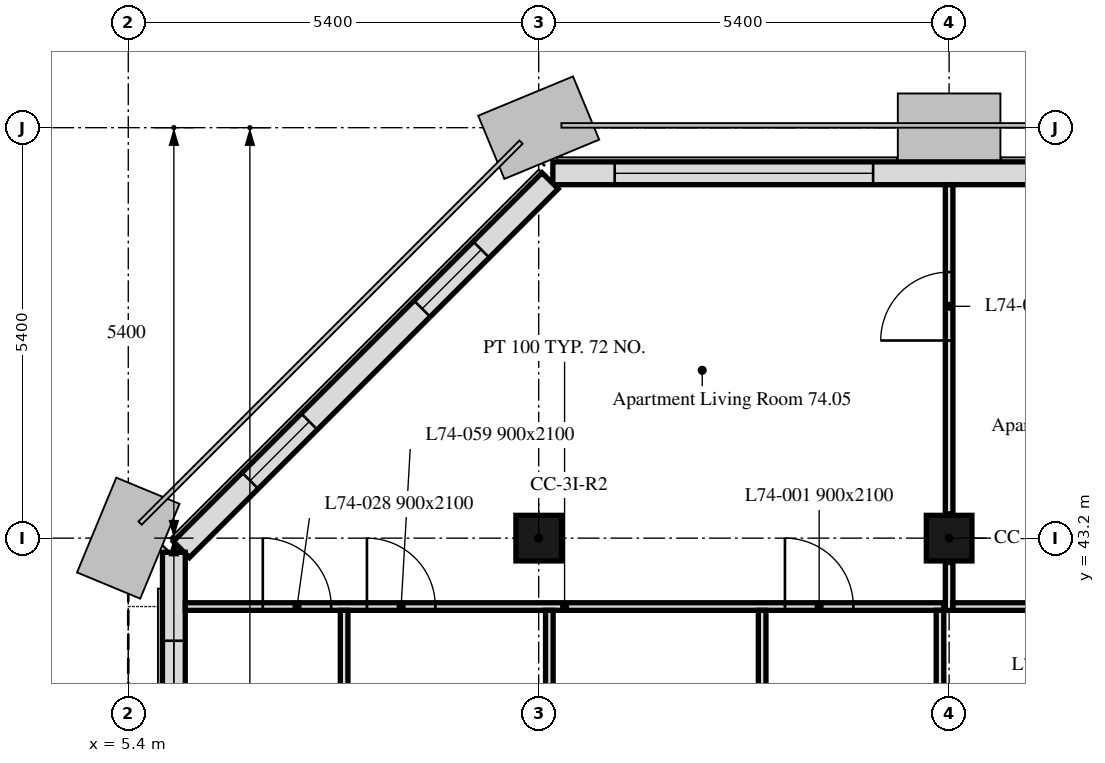
"""IFC4 building model, lengths in metres.
Left out: names, types, materials, properties, quantities, classifications, styles, units other than length and angle.
Written with IfcOpenShell. Run it as: python <this file> out.ifc"""

import sys

from ifc_helpers import new_model, si_unit, direction, frame, frame_2d, origin, origin_2d, place, context, subcontext, project, spatial, rectangle, extrude, element, fill, save


model = new_model("IFC4")
c1 = context("Model", 3, precision=1e-05, world=origin(), true_north=direction((0.0, 1.0)))
c2 = subcontext(c1, "Body", "Model", "MODEL_VIEW")
j1 = project(units=[si_unit("LENGTHUNIT", "METRE"), si_unit("PLANEANGLEUNIT", "RADIAN")], contexts=[c1])
p1 = place(None, origin())
s1 = spatial("IfcSite", under=j1, at=p1, CompositionType="ELEMENT")
p2 = place(p1, origin())
s2 = spatial("IfcBuilding", under=s1, at=p2, CompositionType="ELEMENT")
p3 = place(p2, frame((0.0, 0.0, 298.3)))
s3 = spatial("IfcBuildingStorey", under=s2, at=p3, CompositionType="ELEMENT", Elevation=298.3)
for number, where, z_axis, x_axis in (
    (1, (10.8, 43.2, 0.0), (0.0, 0.0, 1.0), (1.0, 0.0, 0.0)),
    (2, (16.2, 43.2, 0.0), (0.0, 0.0, 1.0), (1.0, 0.0, 0.0)),
):
    element("IfcColumn", number, at=place(p3, frame(where, z_axis=z_axis, x_axis=x_axis)), inside=s3, PredefinedType="COLUMN", context=c2, shape_type="SweptSolid", body=[
        extrude(rectangle(XDim=0.6, YDim=0.6, at=origin_2d()), origin(), (0.0, 0.0, 1.0), 3.0),
    ])
p4 = place(p3, frame((43.014, 48.0, 0.0), z_axis=(0.0, 0.0, 1.0), x_axis=(-1.0, 0.0, 0.0)))
e3 = element("IfcWall", 3, at=p4, inside=s3, PredefinedType="SOLIDWALL", context=c2, shape_type="SweptSolid", body=[
    extrude(rectangle(XDim=32.027, YDim=0.3, at=frame_2d((16.014, 0.0))), origin(), (0.0, 0.0, 1.0), 3.0),
])
p5 = place(p4, frame((2.764, 0.0, 0.9)))
e4 = element("IfcOpeningElement", 4, at=p5, cuts=e3, PredefinedType="OPENING", context=c2, shape_type="SweptSolid", body=[
    extrude(rectangle(XDim=1.1, YDim=1.7, at=frame_2d((0.55, 0.85))), frame((0.0, 0.16, 0.0), z_axis=(0.0, -1.0, 0.0), x_axis=(1.0, 0.0, 0.0)), (0.0, 0.0, 1.0), 0.32),
])
p6 = place(p4, frame((6.214, 0.0, 0.9)))
e5 = element("IfcOpeningElement", 5, at=p6, cuts=e3, PredefinedType="OPENING", context=c2, shape_type="SweptSolid", body=[
    extrude(rectangle(XDim=3.4, YDim=1.7, at=frame_2d((1.7, 0.85))), frame((0.0, 0.16, 0.0), z_axis=(0.0, -1.0, 0.0), x_axis=(1.0, 0.0, 0.0)), (0.0, 0.0, 1.0), 0.32),
])
p7 = place(p4, frame((13.564, 0.0, 0.9)))
e6 = element("IfcOpeningElement", 6, at=p7, cuts=e3, PredefinedType="OPENING", context=c2, shape_type="SweptSolid", body=[
    extrude(rectangle(XDim=1.1, YDim=1.7, at=frame_2d((0.55, 0.85))), frame((0.0, 0.16, 0.0), z_axis=(0.0, -1.0, 0.0), x_axis=(1.0, 0.0, 0.0)), (0.0, 0.0, 1.0), 0.32),
])
p8 = place(p4, frame((17.014, 0.0, 0.9)))
e7 = element("IfcOpeningElement", 7, at=p8, cuts=e3, PredefinedType="OPENING", context=c2, shape_type="SweptSolid", body=[
    extrude(rectangle(XDim=3.4, YDim=1.7, at=frame_2d((1.7, 0.85))), frame((0.0, 0.16, 0.0), z_axis=(0.0, -1.0, 0.0), x_axis=(1.0, 0.0, 0.0)), (0.0, 0.0, 1.0), 0.32),
])
p9 = place(p4, frame((24.364, 0.0, 0.9)))
e8 = element("IfcOpeningElement", 8, at=p9, cuts=e3, PredefinedType="OPENING", context=c2, shape_type="SweptSolid", body=[
    extrude(rectangle(XDim=1.1, YDim=1.7, at=frame_2d((0.55, 0.85))), frame((0.0, 0.16, 0.0), z_axis=(0.0, -1.0, 0.0), x_axis=(1.0, 0.0, 0.0)), (0.0, 0.0, 1.0), 0.32),
])
p10 = place(p4, frame((27.814, 0.0, 0.9)))
e9 = element("IfcOpeningElement", 9, at=p10, cuts=e3, PredefinedType="OPENING", context=c2, shape_type="SweptSolid", body=[
    extrude(rectangle(XDim=3.4, YDim=1.7, at=frame_2d((1.7, 0.85))), frame((0.0, 0.16, 0.0), z_axis=(0.0, -1.0, 0.0), x_axis=(1.0, 0.0, 0.0)), (0.0, 0.0, 1.0), 0.32),
])
p11 = place(p3, frame((10.949, 47.901, 0.0), z_axis=(0.0, 0.0, 1.0), x_axis=(-0.707106781187, -0.707106781187, 0.0)))
e10 = element("IfcWall", 10, at=p11, inside=s3, PredefinedType="SOLIDWALL", context=c2, shape_type="SweptSolid", body=[
    extrude(rectangle(XDim=6.86, YDim=0.3, at=frame_2d((3.43, 0.0))), origin(), (0.0, 0.0, 1.0), 3.0),
])
p12 = place(p11, frame((1.28, 0.0, 0.9)))
e11 = element("IfcOpeningElement", 11, at=p12, cuts=e10, PredefinedType="OPENING", context=c2, shape_type="SweptSolid", body=[
    extrude(rectangle(XDim=1.1, YDim=1.7, at=frame_2d((0.55, 0.85))), frame((0.0, 0.16, 0.0), z_axis=(0.0, -1.0, 0.0), x_axis=(1.0, 0.0, 0.0)), (0.0, 0.0, 1.0), 0.32),
])
p13 = place(p11, frame((4.48, 0.0, 0.9)))
e12 = element("IfcOpeningElement", 12, at=p13, cuts=e10, PredefinedType="OPENING", context=c2, shape_type="SweptSolid", body=[
    extrude(rectangle(XDim=1.1, YDim=1.7, at=frame_2d((0.55, 0.85))), frame((0.0, 0.16, 0.0), z_axis=(0.0, -1.0, 0.0), x_axis=(1.0, 0.0, 0.0)), (0.0, 0.0, 1.0), 0.32),
])
p14 = place(p3, frame((6.0, 43.014, 0.0), z_axis=(0.0, 0.0, 1.0), x_axis=(0.0, -1.0, 0.0)))
e13 = element("IfcWall", 13, at=p14, inside=s3, PredefinedType="SOLIDWALL", context=c2, shape_type="SweptSolid", body=[
    extrude(rectangle(XDim=10.614, YDim=0.3, at=frame_2d((5.307, 0.0))), origin(), (0.0, 0.0, 1.0), 3.0),
])
p15 = place(p14, frame((1.164, 0.0, 0.9)))
e14 = element("IfcOpeningElement", 14, at=p15, cuts=e13, PredefinedType="OPENING", context=c2, shape_type="SweptSolid", body=[
    extrude(rectangle(XDim=1.1, YDim=1.7, at=frame_2d((0.55, 0.85))), frame((0.0, 0.16, 0.0), z_axis=(0.0, -1.0, 0.0), x_axis=(1.0, 0.0, 0.0)), (0.0, 0.0, 1.0), 0.32),
])
p16 = place(p14, frame((2.764, 0.0, 0.9)))
e15 = element("IfcOpeningElement", 15, at=p16, cuts=e13, PredefinedType="OPENING", context=c2, shape_type="SweptSolid", body=[
    extrude(rectangle(XDim=1.1, YDim=1.7, at=frame_2d((0.55, 0.85))), frame((0.0, 0.16, 0.0), z_axis=(0.0, -1.0, 0.0), x_axis=(1.0, 0.0, 0.0)), (0.0, 0.0, 1.0), 0.32),
])
p17 = place(p14, frame((6.564, 0.0, 0.9)))
e16 = element("IfcOpeningElement", 16, at=p17, cuts=e13, PredefinedType="OPENING", context=c2, shape_type="SweptSolid", body=[
    extrude(rectangle(XDim=1.1, YDim=1.7, at=frame_2d((0.55, 0.85))), frame((0.0, 0.16, 0.0), z_axis=(0.0, -1.0, 0.0), x_axis=(1.0, 0.0, 0.0)), (0.0, 0.0, 1.0), 0.32),
])
p18 = place(p14, frame((7.989, 0.0, 0.9)))
e17 = element("IfcOpeningElement", 17, at=p18, cuts=e13, PredefinedType="OPENING", context=c2, shape_type="SweptSolid", body=[
    extrude(rectangle(XDim=0.65, YDim=1.7, at=frame_2d((0.325, 0.85))), frame((0.0, 0.16, 0.0), z_axis=(0.0, -1.0, 0.0), x_axis=(1.0, 0.0, 0.0)), (0.0, 0.0, 1.0), 0.32),
])
p19 = place(p3, frame((6.151, 42.3, 0.0), z_axis=(0.0, 0.0, 1.0), x_axis=(1.0, 0.0, 0.0)))
e18 = element("IfcWall", 18, at=p19, inside=s3, PredefinedType="PARTITIONING", context=c2, shape_type="SweptSolid", body=[
    extrude(rectangle(XDim=9.979, YDim=0.1, at=frame_2d((4.99, 0.0))), origin(), (0.0, 0.0, 1.0), 3.0),
])
p20 = place(p19, frame((7.889, 0.0, 0.0)))
e19 = element("IfcOpeningElement", 19, at=p20, cuts=e18, PredefinedType="OPENING", context=c2, shape_type="SweptSolid", body=[
    extrude(rectangle(XDim=0.9, YDim=2.1, at=frame_2d((0.45, 1.05))), frame((0.0, 0.05, 0.0), z_axis=(0.0, -1.0, 0.0), x_axis=(1.0, 0.0, 0.0)), (0.0, 0.0, 1.0), 0.1),
])
p21 = place(p19, frame((1.019, 0.0, 0.0)))
e20 = element("IfcOpeningElement", 20, at=p21, cuts=e18, PredefinedType="OPENING", context=c2, shape_type="SweptSolid", body=[
    extrude(rectangle(XDim=0.9, YDim=2.1, at=frame_2d((0.45, 1.05))), frame((0.0, 0.05, 0.0), z_axis=(0.0, -1.0, 0.0), x_axis=(1.0, 0.0, 0.0)), (0.0, 0.0, 1.0), 0.1),
])
p22 = place(p19, frame((2.389, 0.0, 0.0)))
e21 = element("IfcOpeningElement", 21, at=p22, cuts=e18, PredefinedType="OPENING", context=c2, shape_type="SweptSolid", body=[
    extrude(rectangle(XDim=0.9, YDim=2.1, at=frame_2d((0.45, 1.05))), frame((0.0, 0.05, 0.0), z_axis=(0.0, -1.0, 0.0), x_axis=(1.0, 0.0, 0.0)), (0.0, 0.0, 1.0), 0.1),
])
p23 = place(p3, frame((16.2, 42.25, 0.0), z_axis=(0.0, 0.0, 1.0), x_axis=(0.0, 1.0, 0.0)))
e22 = element("IfcWall", 22, at=p23, inside=s3, PredefinedType="PARTITIONING", context=c2, shape_type="SweptSolid", body=[
    extrude(rectangle(XDim=0.63, YDim=0.1, at=frame_2d((0.315, 0.0))), origin(), (0.0, 0.0, 1.0), 2.4),
])
p24 = place(p3, frame((16.2, 43.52, 0.0), z_axis=(0.0, 0.0, 1.0), x_axis=(0.0, 1.0, 0.0)))
e23 = element("IfcWall", 23, at=p24, inside=s3, PredefinedType="PARTITIONING", context=c2, shape_type="SweptSolid", body=[
    extrude(rectangle(XDim=4.329, YDim=0.1, at=frame_2d((2.165, 0.0))), origin(), (0.0, 0.0, 1.0), 2.4),
])
p25 = place(p24, frame((2.28, 0.0, 0.0)))
e24 = element("IfcOpeningElement", 24, at=p25, cuts=e23, PredefinedType="OPENING", context=c2, shape_type="SweptSolid", body=[
    extrude(rectangle(XDim=0.9, YDim=2.1, at=frame_2d((0.45, 1.05))), frame((0.0, 0.05, 0.0), z_axis=(0.0, -1.0, 0.0), x_axis=(1.0, 0.0, 0.0)), (0.0, 0.0, 1.0), 0.1),
])
p26 = place(p3, frame((16.25, 42.3, 0.0), z_axis=(0.0, 0.0, 1.0), x_axis=(1.0, 0.0, 0.0)))
e25 = element("IfcWall", 25, at=p26, inside=s3, PredefinedType="PARTITIONING", context=c2, shape_type="SweptSolid", body=[
    extrude(rectangle(XDim=5.275, YDim=0.1, at=frame_2d((2.637, 0.0))), origin(), (0.0, 0.0, 1.0), 3.0),
])
p27 = place(p26, frame((2.08, 0.0, 0.0)))
e26 = element("IfcOpeningElement", 26, at=p27, cuts=e25, PredefinedType="OPENING", context=c2, shape_type="SweptSolid", body=[
    extrude(rectangle(XDim=0.9, YDim=2.1, at=frame_2d((0.45, 1.05))), frame((0.0, 0.05, 0.0), z_axis=(0.0, -1.0, 0.0), x_axis=(1.0, 0.0, 0.0)), (0.0, 0.0, 1.0), 0.1),
])
p28 = place(p26, frame((3.45, 0.0, 0.0)))
e27 = element("IfcOpeningElement", 27, at=p28, cuts=e25, PredefinedType="OPENING", context=c2, shape_type="SweptSolid", body=[
    extrude(rectangle(XDim=0.9, YDim=2.1, at=frame_2d((0.45, 1.05))), frame((0.0, 0.05, 0.0), z_axis=(0.0, -1.0, 0.0), x_axis=(1.0, 0.0, 0.0)), (0.0, 0.0, 1.0), 0.1),
])
p29 = place(p3, frame((8.24, 34.275, 0.0), z_axis=(0.0, 0.0, 1.0), x_axis=(0.0, 1.0, 0.0)))
e28 = element("IfcWall", 28, at=p29, inside=s3, PredefinedType="PARTITIONING", context=c2, shape_type="SweptSolid", body=[
    extrude(rectangle(XDim=7.975, YDim=0.1, at=frame_2d((3.988, 0.0))), origin(), (0.0, 0.0, 1.0), 3.0),
])
p30 = place(p29, frame((0.825, 0.0, 0.0)))
e29 = element("IfcOpeningElement", 29, at=p30, cuts=e28, PredefinedType="OPENING", context=c2, shape_type="SweptSolid", body=[
    extrude(rectangle(XDim=0.9, YDim=2.1, at=frame_2d((0.45, 1.05))), frame((0.0, 0.05, 0.0), z_axis=(0.0, -1.0, 0.0), x_axis=(1.0, 0.0, 0.0)), (0.0, 0.0, 1.0), 0.1),
])
p31 = place(p29, frame((4.875, 0.0, 0.0)))
e30 = element("IfcOpeningElement", 30, at=p31, cuts=e28, PredefinedType="OPENING", context=c2, shape_type="SweptSolid", body=[
    extrude(rectangle(XDim=0.9, YDim=2.1, at=frame_2d((0.45, 1.05))), frame((0.0, 0.05, 0.0), z_axis=(0.0, -1.0, 0.0), x_axis=(1.0, 0.0, 0.0)), (0.0, 0.0, 1.0), 0.1),
])
p32 = place(p3, frame((10.94, 38.12, 0.0), z_axis=(0.0, 0.0, 1.0), x_axis=(0.0, 1.0, 0.0)))
e31 = element("IfcWall", 31, at=p32, inside=s3, PredefinedType="PARTITIONING", context=c2, shape_type="SweptSolid", body=[
    extrude(rectangle(XDim=4.13, YDim=0.1, at=frame_2d((2.065, 0.0))), origin(), (0.0, 0.0, 1.0), 3.0),
])
p33 = place(p32, frame((2.005, 0.0, 0.0)))
e32 = element("IfcOpeningElement", 32, at=p33, cuts=e31, PredefinedType="OPENING", context=c2, shape_type="SweptSolid", body=[
    extrude(rectangle(XDim=0.9, YDim=2.1, at=frame_2d((0.45, 1.05))), frame((0.0, 0.05, 0.0), z_axis=(0.0, -1.0, 0.0), x_axis=(1.0, 0.0, 0.0)), (0.0, 0.0, 1.0), 0.1),
])
p34 = place(p3, frame((13.74, 34.275, 0.0), z_axis=(0.0, 0.0, 1.0), x_axis=(0.0, 1.0, 0.0)))
e33 = element("IfcWall", 33, at=p34, inside=s3, PredefinedType="PARTITIONING", context=c2, shape_type="SweptSolid", body=[
    extrude(rectangle(XDim=7.975, YDim=0.1, at=frame_2d((3.988, 0.0))), origin(), (0.0, 0.0, 1.0), 3.0),
])
p35 = place(p3, frame((16.08, 38.12, 0.0), z_axis=(0.0, 0.0, 1.0), x_axis=(0.0, 1.0, 0.0)))
e34 = element("IfcWall", 34, at=p35, inside=s3, PredefinedType="PARTITIONING", context=c2, shape_type="SweptSolid", body=[
    extrude(rectangle(XDim=4.13, YDim=0.1, at=frame_2d((2.065, 0.0))), origin(), (0.0, 0.0, 1.0), 2.4),
])
p36 = place(p10, origin())
e35 = element("IfcWindow", 35, at=p36, inside=s3, PartitioningType="SINGLE_PANEL", PredefinedType="WINDOW", context=c2, shape_type="SweptSolid", body=[
    extrude(rectangle(XDim=3.4, YDim=1.7, at=frame_2d((1.7, 0.85))), frame((0.0, 0.03, 0.0), z_axis=(0.0, -1.0, 0.0), x_axis=(1.0, 0.0, 0.0)), (0.0, 0.0, 1.0), 0.06),
])
fill(e9, e35)
p37 = place(p12, origin())
e36 = element("IfcWindow", 36, at=p37, inside=s3, PartitioningType="SINGLE_PANEL", PredefinedType="WINDOW", context=c2, shape_type="SweptSolid", body=[
    extrude(rectangle(XDim=1.1, YDim=1.7, at=frame_2d((0.55, 0.85))), frame((0.0, 0.03, 0.0), z_axis=(0.0, -1.0, 0.0), x_axis=(1.0, 0.0, 0.0)), (0.0, 0.0, 1.0), 0.06),
])
fill(e11, e36)
p38 = place(p13, origin())
e37 = element("IfcWindow", 37, at=p38, inside=s3, PartitioningType="SINGLE_PANEL", PredefinedType="WINDOW", context=c2, shape_type="SweptSolid", body=[
    extrude(rectangle(XDim=1.1, YDim=1.7, at=frame_2d((0.55, 0.85))), frame((0.0, 0.03, 0.0), z_axis=(0.0, -1.0, 0.0), x_axis=(1.0, 0.0, 0.0)), (0.0, 0.0, 1.0), 0.06),
])
fill(e12, e37)
p39 = place(p15, origin())
e38 = element("IfcWindow", 38, at=p39, inside=s3, PartitioningType="SINGLE_PANEL", PredefinedType="WINDOW", context=c2, shape_type="SweptSolid", body=[
    extrude(rectangle(XDim=1.1, YDim=1.7, at=frame_2d((0.55, 0.85))), frame((0.0, 0.03, 0.0), z_axis=(0.0, -1.0, 0.0), x_axis=(1.0, 0.0, 0.0)), (0.0, 0.0, 1.0), 0.06),
])
fill(e14, e38)
p40 = place(p20, origin())
e39 = element("IfcDoor", 39, at=p40, inside=s3, OperationType="SINGLE_SWING_LEFT", PredefinedType="DOOR", context=c2, shape_type="SweptSolid", body=[
    extrude(rectangle(XDim=0.9, YDim=2.1, at=frame_2d((0.45, 1.05))), frame((0.0, 0.025, 0.0), z_axis=(0.0, -1.0, 0.0), x_axis=(1.0, 0.0, 0.0)), (0.0, 0.0, 1.0), 0.05),
])
fill(e19, e39)
p41 = place(p21, origin())
e40 = element("IfcDoor", 40, at=p41, inside=s3, OperationType="SINGLE_SWING_RIGHT", PredefinedType="DOOR", context=c2, shape_type="SweptSolid", body=[
    extrude(rectangle(XDim=0.9, YDim=2.1, at=frame_2d((0.45, 1.05))), frame((0.0, 0.025, 0.0), z_axis=(0.0, -1.0, 0.0), x_axis=(1.0, 0.0, 0.0)), (0.0, 0.0, 1.0), 0.05),
])
fill(e20, e40)
p42 = place(p25, origin())
e41 = element("IfcDoor", 41, at=p42, inside=s3, OperationType="SINGLE_SWING_RIGHT", PredefinedType="DOOR", context=c2, shape_type="SweptSolid", body=[
    extrude(rectangle(XDim=0.9, YDim=2.1, at=frame_2d((0.45, 1.05))), frame((0.0, 0.025, 0.0), z_axis=(0.0, -1.0, 0.0), x_axis=(1.0, 0.0, 0.0)), (0.0, 0.0, 1.0), 0.05),
])
fill(e24, e41)
p43 = place(p22, origin())
e42 = element("IfcDoor", 42, at=p43, inside=s3, OperationType="SINGLE_SWING_LEFT", PredefinedType="DOOR", context=c2, shape_type="SweptSolid", body=[
    extrude(rectangle(XDim=0.9, YDim=2.1, at=frame_2d((0.45, 1.05))), frame((0.0, 0.025, 0.0), z_axis=(0.0, -1.0, 0.0), x_axis=(1.0, 0.0, 0.0)), (0.0, 0.0, 1.0), 0.05),
])
fill(e21, e42)
save(model, sys.argv[1])
